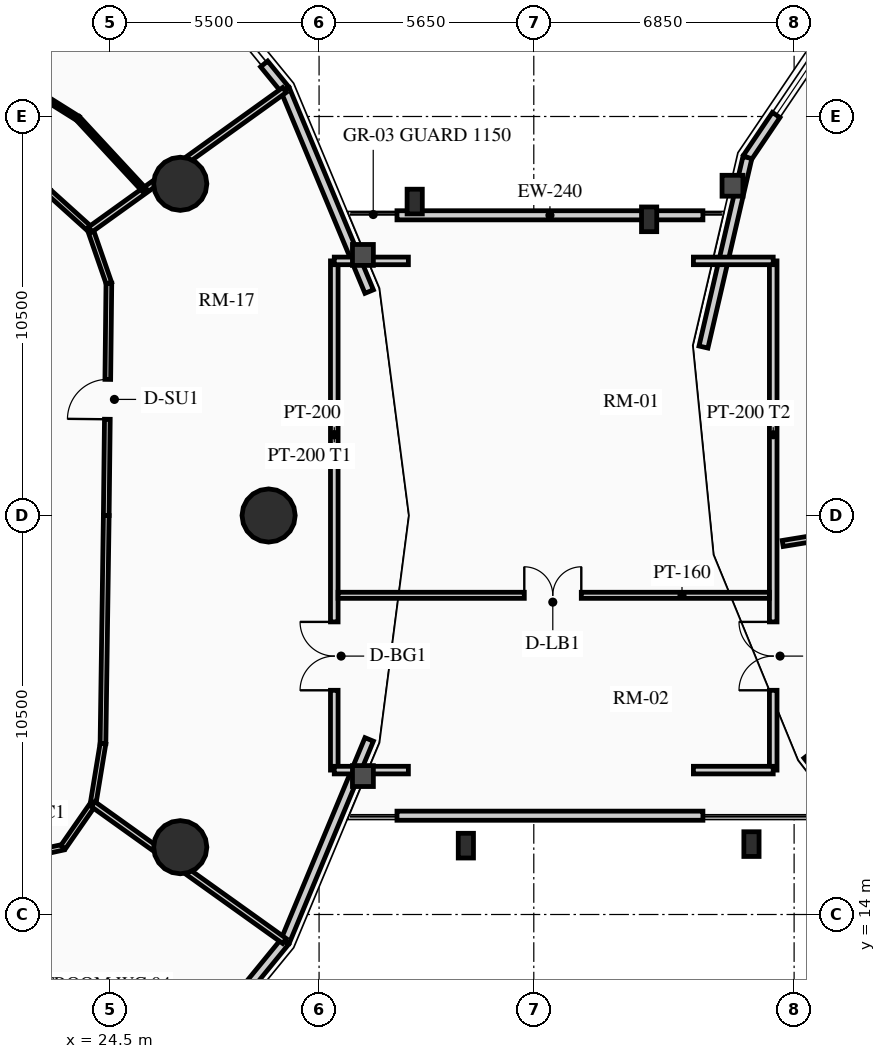
"""IFC4 building model, lengths in metres.
Left out: names, types, materials, properties, quantities, classifications, styles, units other than length and angle.
Written with IfcOpenShell. Run it as: python <this file> out.ifc"""

import sys

from ifc_helpers import new_model, si_unit, direction, frame, frame_2d, origin, origin_2d, place, context, subcontext, project, spatial, rectangle, hollow_rectangle, circle, extrude, source, transform, mapped, element, fill, save


model = new_model("IFC4")
c1 = context("Model", 3, precision=1e-05, world=origin(), true_north=direction((0.0, 1.0)))
c2 = subcontext(c1, "Body", "Model", "MODEL_VIEW")
j1 = project(units=[si_unit("LENGTHUNIT", "METRE"), si_unit("PLANEANGLEUNIT", "RADIAN")], contexts=[c1])
p1 = place(None, origin())
s1 = spatial("IfcSite", under=j1, at=p1, CompositionType="ELEMENT")
p2 = place(p1, origin())
s2 = spatial("IfcBuilding", under=s1, at=p2, CompositionType="ELEMENT")
p3 = place(p2, frame((0.0, 0.0, 125.44)))
s3 = spatial("IfcBuildingStorey", under=s2, at=p3, CompositionType="ELEMENT", Elevation=125.44)
for number, where, z_axis, x_axis in (
    (1, (28.672, 24.5, 0.0), (0.0, 0.0, 1.0), (1.0, 0.0, 0.0)),
    (2, (26.347, 33.229, 0.0), (0.0, 0.0, 1.0), (1.0, 0.0, 0.0)),
    (3, (26.347, 15.771, 0.0), (0.0, 0.0, 1.0), (1.0, 0.0, 0.0)),
):
    element("IfcColumn", number, at=place(p3, frame(where, z_axis=z_axis, x_axis=x_axis)), inside=s3, PredefinedType="USERDEFINED", context=c2, shape_type="SweptSolid", body=[
        extrude(circle(Radius=0.7, at=origin_2d()), origin(), (0.0, 0.0, 1.0), 3.72),
    ])
for number, where, z_axis, x_axis in (
    (4, (33.863, 15.812, -0.28), (0.0, 0.0, 1.0), (1.0, 0.0, 0.0)),
    (5, (41.378, 15.853, -0.28), (0.0, 0.0, 1.0), (1.0, 0.0, 0.0)),
    (6, (32.516, 32.761, -0.28), (0.0, 0.0, 1.0), (1.0, 0.0, 0.0)),
    (7, (38.685, 32.294, -0.28), (0.0, 0.0, 1.0), (1.0, 0.0, 0.0)),
):
    element("IfcColumn", number, at=place(p3, frame(where, z_axis=z_axis, x_axis=x_axis)), inside=s3, PredefinedType="COLUMN", context=c2, shape_type="SweptSolid", body=[
        extrude(hollow_rectangle(XDim=0.4, YDim=0.65, WallThickness=0.025, at=origin_2d()), origin(), (0.0, 0.0, 1.0), 4.0),
    ])
p4 = place(p3, frame((29.105, 35.709, 0.0), z_axis=(0.0, 0.0, 1.0), x_axis=(0.384344417632, -0.923189779317, 0.0)))
e8 = element("IfcWall", 8, at=p4, inside=s3, PredefinedType="SOLIDWALL", context=c2, shape_type="SweptSolid", body=[
    extrude(rectangle(XDim=5.758, YDim=0.24, at=frame_2d((2.879, 0.0))), origin(), (0.0, 0.0, 1.0), 2.949),
])
p5 = place(p3, frame((28.555, 36.383, 0.0), z_axis=(0.0, 0.0, 1.0), x_axis=(0.632702874536, -0.774394649099, 0.0)))
e9 = element("IfcWall", 9, at=p5, inside=s3, PredefinedType="SOLIDWALL", context=c2, shape_type="SweptSolid", body=[
    extrude(rectangle(XDim=0.87, YDim=0.24, at=frame_2d((0.435, 0.0))), origin(), (0.0, 0.0, 1.0), 2.949),
])
p6 = place(p3, frame((29.105, 13.291, 0.0), z_axis=(0.0, 0.0, 1.0), x_axis=(-0.632700781152, -0.77439635945, 0.0)))
e10 = element("IfcWall", 10, at=p6, inside=s3, PredefinedType="SOLIDWALL", context=c2, shape_type="SweptSolid", body=[
    extrude(rectangle(XDim=5.448, YDim=0.24, at=frame_2d((2.724, 0.0))), origin(), (0.0, 0.0, 1.0), 2.949),
])
m1 = source(origin(), c2, "Body", "SweptSolid", [
    extrude(rectangle(XDim=2.2, YDim=1.35, at=frame_2d((1.1, 0.675))), frame((0.0, 0.13, 0.0), z_axis=(0.0, -1.0, 0.0), x_axis=(1.0, 0.0, 0.0)), (0.0, 0.0, 1.0), 0.26),
])
p7 = place(p6, frame((1.624, 0.0, 0.65)))
e11 = element("IfcOpeningElement", 11, at=p7, cuts=e10, PredefinedType="OPENING", context=c2, shape_type="MappedRepresentation", body=[
    mapped(m1, transform((0.0, 0.0, 0.0), x_axis=(1.0, 0.0, 0.0), y_axis=(0.0, 1.0, 0.0), z_axis=(0.0, 0.0, 1.0), scale=1.0)),
])
p8 = place(p3, frame((31.318, 18.607, 0.0), z_axis=(0.0, 0.0, 1.0), x_axis=(-0.384344417632, -0.923189779317, 0.0)))
e12 = element("IfcWall", 12, at=p8, inside=s3, PredefinedType="SOLIDWALL", context=c2, shape_type="SweptSolid", body=[
    extrude(rectangle(XDim=5.758, YDim=0.24, at=frame_2d((2.879, 0.0))), origin(), (0.0, 0.0, 1.0), 2.949),
])
p9 = place(p3, frame((41.271, 33.92, 0.0), z_axis=(0.0, 0.0, 1.0), x_axis=(0.559572880421, 0.828781148131, 0.0)))
e13 = element("IfcWall", 13, at=p9, inside=s3, PredefinedType="SOLIDWALL", context=c2, shape_type="SweptSolid", body=[
    extrude(rectangle(XDim=4.905, YDim=0.24, at=frame_2d((2.452, 0.0))), origin(), (0.0, 0.0, 1.0), 2.949),
])
p10 = place(p9, frame((1.352, 0.0, 0.65)))
e14 = element("IfcOpeningElement", 14, at=p10, cuts=e13, PredefinedType="OPENING", context=c2, shape_type="MappedRepresentation", body=[
    mapped(m1, transform((0.0, 0.0, 0.0), x_axis=(1.0, 0.0, 0.0), y_axis=(0.0, 1.0, 0.0), z_axis=(0.0, 0.0, 1.0), scale=1.0)),
])
p11 = place(p3, frame((40.115, 28.933, 0.0), z_axis=(0.0, 0.0, 1.0), x_axis=(0.225834725257, 0.974165631126, 0.0)))
e15 = element("IfcWall", 15, at=p11, inside=s3, PredefinedType="SOLIDWALL", context=c2, shape_type="SweptSolid", body=[
    extrude(rectangle(XDim=5.119, YDim=0.24, at=frame_2d((2.56, 0.0))), origin(), (0.0, 0.0, 1.0), 2.949),
])
p12 = place(p3, frame((46.483, 13.483, 0.0), z_axis=(0.0, 0.0, 1.0), x_axis=(-0.61054437102, 0.791982052206, 0.0)))
e16 = element("IfcWall", 16, at=p12, inside=s3, PredefinedType="SOLIDWALL", context=c2, shape_type="SweptSolid", body=[
    extrude(rectangle(XDim=5.942, YDim=0.24, at=frame_2d((2.971, 0.0))), origin(), (0.0, 0.0, 1.0), 2.949),
])
p13 = place(p3, frame((32.05, 32.4, 0.0), z_axis=(0.0, 0.0, 1.0), x_axis=(1.0, 0.0, 0.0)))
e17 = element("IfcWall", 17, at=p13, inside=s3, PredefinedType="SOLIDWALL", context=c2, shape_type="SweptSolid", body=[
    extrude(rectangle(XDim=8.05, YDim=0.24, at=frame_2d((4.025, 0.0))), origin(), (0.0, 0.0, 1.0), 1.212),
])
p14 = place(p3, frame((40.1, 16.6, 0.0), z_axis=(0.0, 0.0, 1.0), x_axis=(-1.0, 0.0, 0.0)))
e18 = element("IfcWall", 18, at=p14, inside=s3, PredefinedType="SOLIDWALL", context=c2, shape_type="SweptSolid", body=[
    extrude(rectangle(XDim=8.05, YDim=0.24, at=frame_2d((4.025, 0.0))), origin(), (0.0, 0.0, 1.0), 3.425),
])
p15 = place(p3, frame((30.4, 17.8, 0.0), z_axis=(0.0, 0.0, 1.0), x_axis=(0.0, 1.0, 0.0)))
e19 = element("IfcWall", 19, at=p15, inside=s3, PredefinedType="PARTITIONING", context=c2, shape_type="SweptSolid", body=[
    extrude(rectangle(XDim=13.4, YDim=0.2, at=frame_2d((6.7, 0.0))), origin(), (0.0, 0.0, 1.0), 2.949),
])
m2 = source(origin(), c2, "Body", "SweptSolid", [
    extrude(rectangle(XDim=1.8, YDim=2.05, at=frame_2d((0.9, 1.025))), frame((0.0, 0.11, 0.0), z_axis=(0.0, -1.0, 0.0), x_axis=(1.0, 0.0, 0.0)), (0.0, 0.0, 1.0), 0.22),
])
p16 = place(p15, frame((2.1, 0.0, 0.0)))
e20 = element("IfcOpeningElement", 20, at=p16, cuts=e19, PredefinedType="OPENING", context=c2, shape_type="MappedRepresentation", body=[
    mapped(m2, transform((0.0, 0.0, 0.0), x_axis=(1.0, 0.0, 0.0), y_axis=(0.0, 1.0, 0.0), z_axis=(0.0, 0.0, 1.0), scale=1.0)),
])
p17 = place(p3, frame((41.95, 17.8, 0.0), z_axis=(0.0, 0.0, 1.0), x_axis=(0.0, 1.0, 0.0)))
e21 = element("IfcWall", 21, at=p17, inside=s3, PredefinedType="PARTITIONING", context=c2, shape_type="SweptSolid", body=[
    extrude(rectangle(XDim=13.4, YDim=0.2, at=frame_2d((6.7, 0.0))), origin(), (0.0, 0.0, 1.0), 2.949),
])
p18 = place(p17, frame((2.1, 0.0, 0.0)))
e22 = element("IfcOpeningElement", 22, at=p18, cuts=e21, PredefinedType="OPENING", context=c2, shape_type="MappedRepresentation", body=[
    mapped(m2, transform((0.0, 0.0, 0.0), x_axis=(1.0, 0.0, 0.0), y_axis=(0.0, 1.0, 0.0), z_axis=(0.0, 0.0, 1.0), scale=1.0)),
])
for number, where, z_axis, x_axis in (
    (23, (30.4, 31.2, 0.0), (0.0, 0.0, 1.0), (1.0, 0.0, 0.0)),
    (24, (30.4, 17.8, 0.0), (0.0, 0.0, 1.0), (1.0, 0.0, 0.0)),
):
    element("IfcWall", number, at=place(p3, frame(where, z_axis=z_axis, x_axis=x_axis)), inside=s3, PredefinedType="PARTITIONING", context=c2, shape_type="SweptSolid", body=[
        extrude(rectangle(XDim=1.95, YDim=0.2, at=frame_2d((0.975, 0.0))), origin(), (0.0, 0.0, 1.0), 2.949),
    ])
p19 = place(p3, frame((39.85, 31.2, 0.0), z_axis=(0.0, 0.0, 1.0), x_axis=(1.0, 0.0, 0.0)))
e25 = element("IfcWall", 25, at=p19, inside=s3, PredefinedType="PARTITIONING", context=c2, shape_type="SweptSolid", body=[
    extrude(rectangle(XDim=2.1, YDim=0.2, at=frame_2d((1.05, 0.0))), origin(), (0.0, 0.0, 1.0), 2.949),
])
p20 = place(p3, frame((39.85, 17.8, 0.0), z_axis=(0.0, 0.0, 1.0), x_axis=(1.0, 0.0, 0.0)))
e26 = element("IfcWall", 26, at=p20, inside=s3, PredefinedType="PARTITIONING", context=c2, shape_type="SweptSolid", body=[
    extrude(rectangle(XDim=2.1, YDim=0.2, at=frame_2d((1.05, 0.0))), origin(), (0.0, 0.0, 1.0), 2.712),
])
p21 = place(p3, frame((30.5, 22.4, 0.0), z_axis=(0.0, 0.0, 1.0), x_axis=(1.0, 0.0, 0.0)))
e27 = element("IfcWall", 27, at=p21, inside=s3, PredefinedType="PARTITIONING", context=c2, shape_type="SweptSolid", body=[
    extrude(rectangle(XDim=11.35, YDim=0.16, at=frame_2d((5.675, 0.0))), origin(), (0.0, 0.0, 1.0), 2.712),
])
m3 = source(origin(), c2, "Body", "SweptSolid", [
    extrude(rectangle(XDim=1.5, YDim=2.02, at=frame_2d((0.75, 1.01))), frame((0.0, 0.09, 0.0), z_axis=(0.0, -1.0, 0.0), x_axis=(1.0, 0.0, 0.0)), (0.0, 0.0, 1.0), 0.18),
])
p22 = place(p21, frame((4.9, 0.0, 0.0)))
e28 = element("IfcOpeningElement", 28, at=p22, cuts=e27, PredefinedType="OPENING", context=c2, shape_type="MappedRepresentation", body=[
    mapped(m3, transform((0.0, 0.0, 0.0), x_axis=(1.0, 0.0, 0.0), y_axis=(0.0, 1.0, 0.0), z_axis=(0.0, 0.0, 1.0), scale=1.0)),
])
p23 = place(p3, frame((24.4, 24.5, 0.0), z_axis=(0.0, 0.0, 1.0), x_axis=(0.011299841544, 0.999936154752, 0.0)))
e29 = element("IfcWall", 29, at=p23, inside=s3, PredefinedType="PARTITIONING", context=c2, shape_type="SweptSolid", body=[
    extrude(rectangle(XDim=6.115, YDim=0.15, at=frame_2d((3.057, 0.0))), origin(), (0.0, 0.0, 1.0), 2.995),
])
m4 = source(origin(), c2, "Body", "SweptSolid", [
    extrude(rectangle(XDim=1.05, YDim=2.015, at=frame_2d((0.525, 1.007))), frame((0.0, 0.085, 0.0), z_axis=(0.0, -1.0, 0.0), x_axis=(1.0, 0.0, 0.0)), (0.0, 0.0, 1.0), 0.17),
])
p24 = place(p23, frame((2.532, 0.0, 0.0)))
e30 = element("IfcOpeningElement", 30, at=p24, cuts=e29, PredefinedType="OPENING", context=c2, shape_type="MappedRepresentation", body=[
    mapped(m4, transform((0.0, 0.0, 0.0), x_axis=(1.0, 0.0, 0.0), y_axis=(0.0, 1.0, 0.0), z_axis=(0.0, 0.0, 1.0), scale=1.0)),
])
p25 = place(p3, frame((24.469, 30.614, 0.0), z_axis=(0.0, 0.0, 1.0), x_axis=(-0.327228335485, 0.944945298129, 0.0)))
e31 = element("IfcWall", 31, at=p25, inside=s3, PredefinedType="PARTITIONING", context=c2, shape_type="SweptSolid", body=[
    extrude(rectangle(XDim=1.495, YDim=0.15, at=frame_2d((0.748, 0.0))), origin(), (0.0, 0.0, 1.0), 2.995),
])
p26 = place(p3, frame((23.98, 32.027, 0.0), z_axis=(0.0, 0.0, 1.0), x_axis=(-0.742353224332, 0.670008724065, 0.0)))
e32 = element("IfcWall", 32, at=p26, inside=s3, PredefinedType="PARTITIONING", context=c2, shape_type="SweptSolid", body=[
    extrude(rectangle(XDim=1.485, YDim=0.15, at=frame_2d((0.742, 0.0))), origin(), (0.0, 0.0, 1.0), 2.995),
])
p27 = place(p3, frame((21.419, 15.369, 0.0), z_axis=(0.0, 0.0, 1.0), x_axis=(0.977192701953, 0.212354475464, 0.0)))
e33 = element("IfcWall", 33, at=p27, inside=s3, PredefinedType="PARTITIONING", context=c2, shape_type="SweptSolid", body=[
    extrude(rectangle(XDim=1.888, YDim=0.15, at=frame_2d((0.944, 0.0))), origin(), (0.0, 0.0, 1.0), 2.995),
])
m5 = source(origin(), c2, "Body", "SweptSolid", [
    extrude(rectangle(XDim=1.0, YDim=2.015, at=frame_2d((0.5, 1.007))), frame((0.0, 0.085, 0.0), z_axis=(0.0, -1.0, 0.0), x_axis=(1.0, 0.0, 0.0)), (0.0, 0.0, 1.0), 0.17),
])
p28 = place(p27, frame((0.444, 0.0, 0.0)))
e34 = element("IfcOpeningElement", 34, at=p28, cuts=e33, PredefinedType="OPENING", context=c2, shape_type="MappedRepresentation", body=[
    mapped(m5, transform((0.0, 0.0, 0.0), x_axis=(1.0, 0.0, 0.0), y_axis=(0.0, 1.0, 0.0), z_axis=(0.0, 0.0, 1.0), scale=1.0)),
])
p29 = place(p3, frame((23.263, 15.77, 0.0), z_axis=(0.0, 0.0, 1.0), x_axis=(0.570743456919, 0.821128434768, 0.0)))
e35 = element("IfcWall", 35, at=p29, inside=s3, PredefinedType="PARTITIONING", context=c2, shape_type="SweptSolid", body=[
    extrude(rectangle(XDim=1.382, YDim=0.15, at=frame_2d((0.691, 0.0))), origin(), (0.0, 0.0, 1.0), 2.995),
])
p30 = place(p3, frame((24.052, 16.905, 0.0), z_axis=(0.0, 0.0, 1.0), x_axis=(0.162091534225, 0.986775726562, 0.0)))
e36 = element("IfcWall", 36, at=p30, inside=s3, PredefinedType="PARTITIONING", context=c2, shape_type="SweptSolid", body=[
    extrude(rectangle(XDim=1.613, YDim=0.15, at=frame_2d((0.807, 0.0))), origin(), (0.0, 0.0, 1.0), 2.995),
])
p31 = place(p3, frame((24.313, 18.496, 0.0), z_axis=(0.0, 0.0, 1.0), x_axis=(0.014394019188, 0.999896400739, 0.0)))
e37 = element("IfcWall", 37, at=p31, inside=s3, PredefinedType="PARTITIONING", context=c2, shape_type="SweptSolid", body=[
    extrude(rectangle(XDim=6.004, YDim=0.15, at=frame_2d((3.002, 0.0))), origin(), (0.0, 0.0, 1.0), 3.425),
])
p32 = place(p3, frame((23.98, 32.027, 0.0), z_axis=(0.0, 0.0, 1.0), x_axis=(0.812162479031, 0.58343132214, 0.0)))
e38 = element("IfcWall", 38, at=p32, inside=s3, PredefinedType="PARTITIONING", context=c2, shape_type="SweptSolid", body=[
    extrude(rectangle(XDim=6.291, YDim=0.16, at=frame_2d((3.146, 0.0))), origin(), (0.0, 0.0, 1.0), 2.949),
])
p33 = place(p3, frame((24.052, 16.905, 0.0), z_axis=(0.0, 0.0, 1.0), x_axis=(0.813437670746, -0.581652091727, 0.0)))
e39 = element("IfcWall", 39, at=p33, inside=s3, PredefinedType="PARTITIONING", context=c2, shape_type="SweptSolid", body=[
    extrude(rectangle(XDim=6.192, YDim=0.16, at=frame_2d((3.096, 0.0))), origin(), (0.0, 0.0, 1.0), 2.949),
])
p34 = place(p3, frame((25.41, 33.054, 0.0), z_axis=(0.0, 0.0, 1.0), x_axis=(-0.679733694606, 0.73345899982, 0.0)))
e40 = element("IfcWall", 40, at=p34, inside=s3, PredefinedType="PARTITIONING", context=c2, shape_type="SweptSolid", body=[
    extrude(rectangle(XDim=2.586, YDim=0.125, at=frame_2d((1.293, 0.0))), origin(), (0.0, 0.0, 1.0), 3.425),
])
p35 = place(p3, frame((23.653, 34.951, 0.0), z_axis=(0.0, 0.0, 1.0), x_axis=(-0.847306782665, 0.531103771452, 0.0)))
e41 = element("IfcWall", 41, at=p35, inside=s3, PredefinedType="PARTITIONING", context=c2, shape_type="SweptSolid", body=[
    extrude(rectangle(XDim=2.581, YDim=0.125, at=frame_2d((1.291, 0.0))), origin(), (0.0, 0.0, 1.0), 2.995),
])
m6 = source(origin(), c2, "Body", "SweptSolid", [
    extrude(rectangle(XDim=0.9, YDim=2.005, at=frame_2d((0.45, 1.002))), frame((0.0, 0.073, 0.0), z_axis=(0.0, -1.0, 0.0), x_axis=(1.0, 0.0, 0.0)), (0.0, 0.0, 1.0), 0.145),
])
p36 = place(p35, frame((0.841, 0.0, 0.0)))
e42 = element("IfcOpeningElement", 42, at=p36, cuts=e41, PredefinedType="OPENING", context=c2, shape_type="MappedRepresentation", body=[
    mapped(m6, transform((0.0, 0.0, 0.0), x_axis=(1.0, 0.0, 0.0), y_axis=(0.0, 1.0, 0.0), z_axis=(0.0, 0.0, 1.0), scale=1.0)),
])
p37 = place(p3, frame((46.795, 24.513, 0.0), z_axis=(0.0, 0.0, 1.0), x_axis=(-0.986967402925, -0.160920308111, 0.0)))
e43 = element("IfcWall", 43, at=p37, inside=s3, PredefinedType="PARTITIONING", context=c2, shape_type="SweptSolid", body=[
    extrude(rectangle(XDim=4.656, YDim=0.16, at=frame_2d((2.328, 0.0))), origin(), (0.0, 0.0, 1.0), 2.949),
])
m7 = source(origin(), c2, "Body", "SweptSolid", [
    extrude(rectangle(XDim=2.2, YDim=1.35, at=frame_2d((1.1, 0.675))), frame((0.0, 0.03, 0.0), z_axis=(0.0, -1.0, 0.0), x_axis=(1.0, 0.0, 0.0)), (0.0, 0.0, 1.0), 0.06),
])
p38 = place(p10, origin())
e44 = element("IfcWindow", 44, at=p38, inside=s3, PartitioningType="DOUBLE_PANEL_VERTICAL", PredefinedType="WINDOW", context=c2, shape_type="MappedRepresentation", body=[
    mapped(m7, transform((0.0, 0.0, 0.0), x_axis=(1.0, 0.0, 0.0), y_axis=(0.0, 1.0, 0.0), z_axis=(0.0, 0.0, 1.0), scale=1.0)),
])
fill(e14, e44)
m8 = source(origin(), c2, "Body", "SweptSolid", [
    extrude(rectangle(XDim=1.8, YDim=2.05, at=frame_2d((0.9, 1.025))), frame((0.0, 0.025, 0.0), z_axis=(0.0, -1.0, 0.0), x_axis=(1.0, 0.0, 0.0)), (0.0, 0.0, 1.0), 0.05),
])
p39 = place(p16, origin())
e45 = element("IfcDoor", 45, at=p39, inside=s3, OperationType="DOUBLE_DOOR_SINGLE_SWING", PredefinedType="DOOR", context=c2, shape_type="MappedRepresentation", body=[
    mapped(m8, transform((0.0, 0.0, 0.0), x_axis=(1.0, 0.0, 0.0), y_axis=(0.0, 1.0, 0.0), z_axis=(0.0, 0.0, 1.0), scale=1.0)),
])
fill(e20, e45)
p40 = place(p18, origin())
e46 = element("IfcDoor", 46, at=p40, inside=s3, OperationType="DOUBLE_DOOR_SINGLE_SWING", PredefinedType="DOOR", context=c2, shape_type="MappedRepresentation", body=[
    mapped(m8, transform((0.0, 0.0, 0.0), x_axis=(1.0, 0.0, 0.0), y_axis=(0.0, 1.0, 0.0), z_axis=(0.0, 0.0, 1.0), scale=1.0)),
])
fill(e22, e46)
m9 = source(origin(), c2, "Body", "SweptSolid", [
    extrude(rectangle(XDim=1.5, YDim=2.02, at=frame_2d((0.75, 1.01))), frame((0.0, 0.025, 0.0), z_axis=(0.0, -1.0, 0.0), x_axis=(1.0, 0.0, 0.0)), (0.0, 0.0, 1.0), 0.05),
])
p41 = place(p22, origin())
e47 = element("IfcDoor", 47, at=p41, inside=s3, OperationType="DOUBLE_DOOR_SINGLE_SWING", PredefinedType="DOOR", context=c2, shape_type="MappedRepresentation", body=[
    mapped(m9, transform((0.0, 0.0, 0.0), x_axis=(1.0, 0.0, 0.0), y_axis=(0.0, 1.0, 0.0), z_axis=(0.0, 0.0, 1.0), scale=1.0)),
])
fill(e28, e47)
m10 = source(origin(), c2, "Body", "SweptSolid", [
    extrude(rectangle(XDim=1.05, YDim=2.015, at=frame_2d((0.525, 1.007))), frame((0.0, 0.025, 0.0), z_axis=(0.0, -1.0, 0.0), x_axis=(1.0, 0.0, 0.0)), (0.0, 0.0, 1.0), 0.05),
])
p42 = place(p24, origin())
e48 = element("IfcDoor", 48, at=p42, inside=s3, OperationType="SINGLE_SWING_LEFT", PredefinedType="DOOR", context=c2, shape_type="MappedRepresentation", body=[
    mapped(m10, transform((0.0, 0.0, 0.0), x_axis=(1.0, 0.0, 0.0), y_axis=(0.0, 1.0, 0.0), z_axis=(0.0, 0.0, 1.0), scale=1.0)),
])
fill(e30, e48)
save(model, sys.argv[1])
